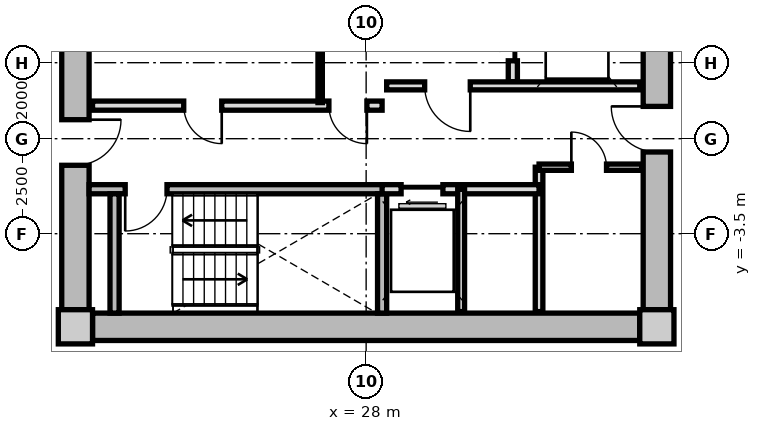
"""IFC4 building model, lengths in metres.
Left out: names, types, materials, properties, quantities, classifications, styles, units other than length and angle.
Written with IfcOpenShell. Run it as: python <this file> out.ifc"""

import sys

from ifc_helpers import new_model, si_unit, direction, frame, frame_2d, origin, origin_2d, place, context, subcontext, project, spatial, rectangle, extrude, source, transform, mapped, element, fill, save


model = new_model("IFC4")
c1 = context("Model", 3, precision=1e-05, world=origin(), true_north=direction((0.0, 1.0)))
c2 = subcontext(c1, "Body", "Model", "MODEL_VIEW")
j1 = project(units=[si_unit("LENGTHUNIT", "METRE"), si_unit("PLANEANGLEUNIT", "RADIAN")], contexts=[c1])
p1 = place(None, origin())
s1 = spatial("IfcSite", under=j1, at=p1, CompositionType="ELEMENT")
p2 = place(p1, origin())
s2 = spatial("IfcBuilding", under=s1, at=p2, CompositionType="ELEMENT")
p3 = place(p2, frame((0.0, 0.0, 102.35)))
s3 = spatial("IfcBuildingStorey", under=s2, at=p3, CompositionType="ELEMENT", Elevation=102.35)
m1 = source(origin(), c2, "Body", "SweptSolid", [
    extrude(rectangle(XDim=0.9, YDim=0.9, at=origin_2d()), origin(), (0.0, 0.0, 1.0), 3.05),
])
for number, where, z_axis, x_axis in (
    (1, (20.35, -5.95, 0.0), (0.0, 0.0, 1.0), (1.0, 0.0, 0.0)),
    (2, (35.65, -5.95, 0.0), (0.0, 0.0, 1.0), (1.0, 0.0, 0.0)),
):
    element("IfcColumn", number, at=place(p3, frame(where, z_axis=z_axis, x_axis=x_axis)), inside=s3, PredefinedType="COLUMN", context=c2, shape_type="MappedRepresentation", body=[
        mapped(m1, transform((0.0, 0.0, 0.0), x_axis=(1.0, 0.0, 0.0), y_axis=(0.0, 1.0, 0.0), z_axis=(0.0, 0.0, 1.0), scale=1.0)),
    ])
m2 = source(origin(), c2, "Body", "SweptSolid", [
    extrude(rectangle(XDim=14.4, YDim=0.72, at=frame_2d((7.2, 0.0))), origin(), (0.0, 0.0, 1.0), 2.79),
])
p4 = place(p3, frame((35.2, -5.95, 0.0), z_axis=(0.0, 0.0, 1.0), x_axis=(-1.0, 0.0, 0.0)))
e3 = element("IfcWall", 3, at=p4, inside=s3, PredefinedType="SHEAR", context=c2, shape_type="MappedRepresentation", body=[
    mapped(m2, transform((0.0, 0.0, 0.0), x_axis=(1.0, 0.0, 0.0), y_axis=(0.0, 1.0, 0.0), z_axis=(0.0, 0.0, 1.0), scale=1.0)),
])
m3 = source(origin(), c2, "Body", "SweptSolid", [
    extrude(rectangle(XDim=11.0, YDim=0.72, at=frame_2d((5.5, 0.0))), origin(), (0.0, 0.0, 1.0), 2.79),
])
p5 = place(p3, frame((20.35, -5.5, 0.0), z_axis=(0.0, 0.0, 1.0), x_axis=(0.0, 1.0, 0.0)))
e4 = element("IfcWall", 4, at=p5, inside=s3, PredefinedType="SHEAR", context=c2, shape_type="MappedRepresentation", body=[
    mapped(m3, transform((0.0, 0.0, 0.0), x_axis=(1.0, 0.0, 0.0), y_axis=(0.0, 1.0, 0.0), z_axis=(0.0, 0.0, 1.0), scale=1.0)),
])
p6 = place(p5, frame((3.8, 0.0, 0.0)))
e5 = element("IfcOpeningElement", 5, at=p6, cuts=e4, PredefinedType="OPENING", context=c2, shape_type="SweptSolid", body=[
    extrude(rectangle(XDim=1.2, YDim=2.15, at=frame_2d((0.6, 1.075))), frame((0.0, 0.37, 0.0), z_axis=(0.0, -1.0, 0.0), x_axis=(1.0, 0.0, 0.0)), (0.0, 0.0, 1.0), 0.74),
])
p7 = place(p3, frame((35.65, 5.5, 0.0), z_axis=(0.0, 0.0, 1.0), x_axis=(0.0, -1.0, 0.0)))
e6 = element("IfcWall", 6, at=p7, inside=s3, PredefinedType="SHEAR", context=c2, shape_type="MappedRepresentation", body=[
    mapped(m3, transform((0.0, 0.0, 0.0), x_axis=(1.0, 0.0, 0.0), y_axis=(0.0, 1.0, 0.0), z_axis=(0.0, 0.0, 1.0), scale=1.0)),
])
p8 = place(p7, frame((5.65, 0.0, 0.0)))
e7 = element("IfcOpeningElement", 7, at=p8, cuts=e6, PredefinedType="OPENING", context=c2, shape_type="SweptSolid", body=[
    extrude(rectangle(XDim=1.2, YDim=2.15, at=frame_2d((0.6, 1.075))), frame((0.0, 0.37, 0.0), z_axis=(0.0, -1.0, 0.0), x_axis=(1.0, 0.0, 0.0)), (0.0, 0.0, 1.0), 0.74),
])
m4 = source(origin(), c2, "Body", "SweptSolid", [
    extrude(rectangle(XDim=7.83, YDim=0.24, at=frame_2d((3.915, 0.0))), origin(), (0.0, 0.0, 1.0), 2.79),
])
p9 = place(p3, frame((20.71, -2.33, 0.0), z_axis=(0.0, 0.0, 1.0), x_axis=(1.0, 0.0, 0.0)))
e8 = element("IfcWall", 8, at=p9, inside=s3, PredefinedType="PARTITIONING", context=c2, shape_type="MappedRepresentation", body=[
    mapped(m4, transform((0.0, 0.0, 0.0), x_axis=(1.0, 0.0, 0.0), y_axis=(0.0, 1.0, 0.0), z_axis=(0.0, 0.0, 1.0), scale=1.0)),
])
p10 = place(p9, frame((0.95, 0.0, 0.0)))
e9 = element("IfcOpeningElement", 9, at=p10, cuts=e8, PredefinedType="OPENING", context=c2, shape_type="SweptSolid", body=[
    extrude(rectangle(XDim=1.1, YDim=2.15, at=frame_2d((0.55, 1.075))), frame((0.0, 0.13, 0.0), z_axis=(0.0, -1.0, 0.0), x_axis=(1.0, 0.0, 0.0)), (0.0, 0.0, 1.0), 0.26),
])
m5 = source(origin(), c2, "Body", "SweptSolid", [
    extrude(rectangle(XDim=3.14, YDim=0.24, at=frame_2d((1.57, 0.0))), origin(), (0.0, 0.0, 1.0), 2.79),
])
for number, where, z_axis, x_axis in (
    (10, (21.38, -5.59, 0.0), (0.0, 0.0, 1.0), (0.0, 1.0, 0.0)),
    (11, (28.42, -5.59, 0.0), (0.0, 0.0, 1.0), (0.0, 1.0, 0.0)),
):
    element("IfcWall", number, at=place(p3, frame(where, z_axis=z_axis, x_axis=x_axis)), inside=s3, PredefinedType="PARTITIONING", context=c2, shape_type="MappedRepresentation", body=[
        mapped(m5, transform((0.0, 0.0, 0.0), x_axis=(1.0, 0.0, 0.0), y_axis=(0.0, 1.0, 0.0), z_axis=(0.0, 0.0, 1.0), scale=1.0)),
    ])
m6 = source(origin(), c2, "Body", "SweptSolid", [
    extrude(rectangle(XDim=5.0, YDim=0.24, at=frame_2d((2.5, 0.0))), origin(), (0.0, 0.0, 1.0), 2.775),
])
p11 = place(p3, frame((31.86, 0.5, 0.0), z_axis=(0.0, 0.0, 1.0), x_axis=(0.0, 1.0, 0.0)))
e12 = element("IfcWall", 12, at=p11, inside=s3, PredefinedType="PARTITIONING", context=c2, shape_type="MappedRepresentation", body=[
    mapped(m6, transform((0.0, 0.0, 0.0), x_axis=(1.0, 0.0, 0.0), y_axis=(0.0, 1.0, 0.0), z_axis=(0.0, 0.0, 1.0), scale=1.0)),
])
p12 = place(p11, frame((3.05, 0.0, 0.0)))
e13 = element("IfcOpeningElement", 13, at=p12, cuts=e12, PredefinedType="OPENING", context=c2, shape_type="SweptSolid", body=[
    extrude(rectangle(XDim=1.3, YDim=2.2, at=frame_2d((0.65, 1.1))), frame((0.0, 0.13, 0.0), z_axis=(0.0, -1.0, 0.0), x_axis=(1.0, 0.0, 0.0)), (0.0, 0.0, 1.0), 0.26),
])
p13 = place(p11, frame((0.55, 0.0, 0.0)))
e14 = element("IfcOpeningElement", 14, at=p13, cuts=e12, PredefinedType="OPENING", context=c2, shape_type="SweptSolid", body=[
    extrude(rectangle(XDim=1.3, YDim=2.2, at=frame_2d((0.65, 1.1))), frame((0.0, 0.13, 0.0), z_axis=(0.0, -1.0, 0.0), x_axis=(1.0, 0.0, 0.0)), (0.0, 0.0, 1.0), 0.26),
])
m7 = source(origin(), c2, "Body", "SweptSolid", [
    extrude(rectangle(XDim=6.66, YDim=0.21, at=frame_2d((3.33, 0.0))), origin(), (0.0, 0.0, 1.0), 2.775),
])
p14 = place(p3, frame((28.54, 0.39, 0.0), z_axis=(0.0, 0.0, 1.0), x_axis=(1.0, 0.0, 0.0)))
e15 = element("IfcWall", 15, at=p14, inside=s3, PredefinedType="PARTITIONING", context=c2, shape_type="MappedRepresentation", body=[
    mapped(m7, transform((0.0, 0.0, 0.0), x_axis=(1.0, 0.0, 0.0), y_axis=(0.0, 1.0, 0.0), z_axis=(0.0, 0.0, 1.0), scale=1.0)),
])
p15 = place(p14, frame((1.0, 0.0, 0.0)))
e16 = element("IfcOpeningElement", 16, at=p15, cuts=e15, PredefinedType="OPENING", context=c2, shape_type="SweptSolid", body=[
    extrude(rectangle(XDim=1.2, YDim=2.15, at=frame_2d((0.6, 1.075))), frame((0.0, 0.115, 0.0), z_axis=(0.0, -1.0, 0.0), x_axis=(1.0, 0.0, 0.0)), (0.0, 0.0, 1.0), 0.23),
])
m8 = source(origin(), c2, "Body", "SweptSolid", [
    extrude(rectangle(XDim=7.62, YDim=0.24, at=frame_2d((3.81, 0.0))), origin(), (0.0, 0.0, 1.0), 2.775),
])
p16 = place(p3, frame((20.8, -0.13, 0.0), z_axis=(0.0, 0.0, 1.0), x_axis=(1.0, 0.0, 0.0)))
e17 = element("IfcWall", 17, at=p16, inside=s3, PredefinedType="PARTITIONING", context=c2, shape_type="MappedRepresentation", body=[
    mapped(m8, transform((0.0, 0.0, 0.0), x_axis=(1.0, 0.0, 0.0), y_axis=(0.0, 1.0, 0.0), z_axis=(0.0, 0.0, 1.0), scale=1.0)),
])
p17 = place(p16, frame((6.22, 0.0, 0.0)))
e18 = element("IfcOpeningElement", 18, at=p17, cuts=e17, PredefinedType="OPENING", context=c2, shape_type="SweptSolid", body=[
    extrude(rectangle(XDim=1.0, YDim=2.1, at=frame_2d((0.5, 1.05))), frame((0.0, 0.13, 0.0), z_axis=(0.0, -1.0, 0.0), x_axis=(1.0, 0.0, 0.0)), (0.0, 0.0, 1.0), 0.26),
])
p18 = place(p16, frame((2.4, 0.0, 0.0)))
e19 = element("IfcOpeningElement", 19, at=p18, cuts=e17, PredefinedType="OPENING", context=c2, shape_type="SweptSolid", body=[
    extrude(rectangle(XDim=1.0, YDim=2.1, at=frame_2d((0.5, 1.05))), frame((0.0, 0.13, 0.0), z_axis=(0.0, -1.0, 0.0), x_axis=(1.0, 0.0, 0.0)), (0.0, 0.0, 1.0), 0.26),
])
m9 = source(origin(), c2, "Body", "SweptSolid", [
    extrude(rectangle(XDim=2.33, YDim=0.115, at=frame_2d((1.165, 0.0))), origin(), (0.0, 0.0, 1.0), 2.775),
])
p19 = place(p3, frame((26.79, -0.05, 0.0), z_axis=(0.0, 0.0, 1.0), x_axis=(0.0, 1.0, 0.0)))
e20 = element("IfcWall", 20, at=p19, inside=s3, PredefinedType="PARTITIONING", context=c2, shape_type="MappedRepresentation", body=[
    mapped(m9, transform((0.0, 0.0, 0.0), x_axis=(1.0, 0.0, 0.0), y_axis=(0.0, 1.0, 0.0), z_axis=(0.0, 0.0, 1.0), scale=1.0)),
])
m10 = source(origin(), c2, "Body", "SweptSolid", [
    extrude(rectangle(XDim=3.8, YDim=0.2, at=frame_2d((1.9, 0.0))), origin(), (0.0, 0.0, 1.0), 2.775),
])
p20 = place(p3, frame((32.55, -5.55, 0.0), z_axis=(0.0, 0.0, 1.0), x_axis=(0.0, 1.0, 0.0)))
e21 = element("IfcWall", 21, at=p20, inside=s3, PredefinedType="PARTITIONING", context=c2, shape_type="MappedRepresentation", body=[
    mapped(m10, transform((0.0, 0.0, 0.0), x_axis=(1.0, 0.0, 0.0), y_axis=(0.0, 1.0, 0.0), z_axis=(0.0, 0.0, 1.0), scale=1.0)),
])
m11 = source(origin(), c2, "Body", "SweptSolid", [
    extrude(rectangle(XDim=4.13, YDim=0.24, at=frame_2d((2.065, 0.0))), origin(), (0.0, 0.0, 1.0), 2.775),
])
p21 = place(p3, frame((28.42, -2.33, 0.0), z_axis=(0.0, 0.0, 1.0), x_axis=(1.0, 0.0, 0.0)))
e22 = element("IfcWall", 22, at=p21, inside=s3, PredefinedType="PARTITIONING", context=c2, shape_type="MappedRepresentation", body=[
    mapped(m11, transform((0.0, 0.0, 0.0), x_axis=(1.0, 0.0, 0.0), y_axis=(0.0, 1.0, 0.0), z_axis=(0.0, 0.0, 1.0), scale=1.0)),
])
p22 = place(p21, frame((0.5, 0.0, 0.0)))
e23 = element("IfcOpeningElement", 23, at=p22, cuts=e22, PredefinedType="OPENING", context=c2, shape_type="SweptSolid", body=[
    extrude(rectangle(XDim=1.1, YDim=2.2, at=frame_2d((0.55, 1.1))), frame((0.0, 0.13, 0.0), z_axis=(0.0, -1.0, 0.0), x_axis=(1.0, 0.0, 0.0)), (0.0, 0.0, 1.0), 0.26),
])
m12 = source(origin(), c2, "Body", "SweptSolid", [
    extrude(rectangle(XDim=3.22, YDim=0.18, at=frame_2d((1.61, 0.0))), origin(), (0.0, 0.0, 1.0), 2.775),
])
p23 = place(p3, frame((30.5, -5.55, 0.0), z_axis=(0.0, 0.0, 1.0), x_axis=(0.0, 1.0, 0.0)))
e24 = element("IfcWall", 24, at=p23, inside=s3, PredefinedType="PARTITIONING", context=c2, shape_type="MappedRepresentation", body=[
    mapped(m12, transform((0.0, 0.0, 0.0), x_axis=(1.0, 0.0, 0.0), y_axis=(0.0, 1.0, 0.0), z_axis=(0.0, 0.0, 1.0), scale=1.0)),
])
m13 = source(origin(), c2, "Body", "SweptSolid", [
    extrude(rectangle(XDim=2.7, YDim=0.165, at=frame_2d((1.35, 0.0))), origin(), (0.0, 0.0, 1.0), 2.775),
])
p24 = place(p3, frame((32.55, -1.75, 0.0), z_axis=(0.0, 0.0, 1.0), x_axis=(1.0, 0.0, 0.0)))
e25 = element("IfcWall", 25, at=p24, inside=s3, PredefinedType="PARTITIONING", context=c2, shape_type="MappedRepresentation", body=[
    mapped(m13, transform((0.0, 0.0, 0.0), x_axis=(1.0, 0.0, 0.0), y_axis=(0.0, 1.0, 0.0), z_axis=(0.0, 0.0, 1.0), scale=1.0)),
])
p25 = place(p24, frame((0.85, 0.0, 0.0)))
e26 = element("IfcOpeningElement", 26, at=p25, cuts=e25, PredefinedType="OPENING", context=c2, shape_type="SweptSolid", body=[
    extrude(rectangle(XDim=0.925, YDim=2.1, at=frame_2d((0.462, 1.05))), frame((0.0, 0.093, 0.0), z_axis=(0.0, -1.0, 0.0), x_axis=(1.0, 0.0, 0.0)), (0.0, 0.0, 1.0), 0.185),
])
m14 = source(origin(), c2, "Body", "SweptSolid", [
    extrude(rectangle(XDim=1.1, YDim=2.15, at=frame_2d((0.55, 1.075))), frame((0.0, 0.025, 0.0), z_axis=(0.0, -1.0, 0.0), x_axis=(1.0, 0.0, 0.0)), (0.0, 0.0, 1.0), 0.05),
])
p26 = place(p10, frame((1.1, 0.0, 0.0), z_axis=(0.0, 0.0, 1.0), x_axis=(-1.0, 0.0, 0.0)))
e27 = element("IfcDoor", 27, at=p26, inside=s3, OperationType="SINGLE_SWING_RIGHT", PredefinedType="DOOR", context=c2, shape_type="MappedRepresentation", body=[
    mapped(m14, transform((0.0, 0.0, 0.0), x_axis=(1.0, 0.0, 0.0), y_axis=(0.0, 1.0, 0.0), z_axis=(0.0, 0.0, 1.0), scale=1.0)),
])
fill(e9, e27)
m15 = source(origin(), c2, "Body", "SweptSolid", [
    extrude(rectangle(XDim=1.3, YDim=2.2, at=frame_2d((0.65, 1.1))), frame((0.0, 0.025, 0.0), z_axis=(0.0, -1.0, 0.0), x_axis=(1.0, 0.0, 0.0)), (0.0, 0.0, 1.0), 0.05),
])
p27 = place(p13, origin())
e28 = element("IfcDoor", 28, at=p27, inside=s3, OperationType="SLIDING_TO_RIGHT", PredefinedType="DOOR", context=c2, shape_type="MappedRepresentation", body=[
    mapped(m15, transform((0.0, 0.0, 0.0), x_axis=(1.0, 0.0, 0.0), y_axis=(0.0, 1.0, 0.0), z_axis=(0.0, 0.0, 1.0), scale=1.0)),
])
fill(e14, e28)
m16 = source(origin(), c2, "Body", "SweptSolid", [
    extrude(rectangle(XDim=1.2, YDim=2.15, at=frame_2d((0.6, 1.075))), frame((0.0, 0.025, 0.0), z_axis=(0.0, -1.0, 0.0), x_axis=(1.0, 0.0, 0.0)), (0.0, 0.0, 1.0), 0.05),
])
p28 = place(p15, frame((1.2, 0.0, 0.0), z_axis=(0.0, 0.0, 1.0), x_axis=(-1.0, 0.0, 0.0)))
e29 = element("IfcDoor", 29, at=p28, inside=s3, OperationType="SINGLE_SWING_LEFT", PredefinedType="DOOR", context=c2, shape_type="MappedRepresentation", body=[
    mapped(m16, transform((0.0, 0.0, 0.0), x_axis=(1.0, 0.0, 0.0), y_axis=(0.0, 1.0, 0.0), z_axis=(0.0, 0.0, 1.0), scale=1.0)),
])
fill(e16, e29)
p29 = place(p6, frame((1.2, 0.0, 0.0), z_axis=(0.0, 0.0, 1.0), x_axis=(-1.0, 0.0, 0.0)))
e30 = element("IfcDoor", 30, at=p29, inside=s3, OperationType="SINGLE_SWING_LEFT", PredefinedType="DOOR", context=c2, shape_type="MappedRepresentation", body=[
    mapped(m16, transform((0.0, 0.0, 0.0), x_axis=(1.0, 0.0, 0.0), y_axis=(0.0, 1.0, 0.0), z_axis=(0.0, 0.0, 1.0), scale=1.0)),
])
fill(e5, e30)
p30 = place(p8, frame((1.2, 0.0, 0.0), z_axis=(0.0, 0.0, 1.0), x_axis=(-1.0, 0.0, 0.0)))
e31 = element("IfcDoor", 31, at=p30, inside=s3, OperationType="SINGLE_SWING_RIGHT", PredefinedType="DOOR", context=c2, shape_type="MappedRepresentation", body=[
    mapped(m16, transform((0.0, 0.0, 0.0), x_axis=(1.0, 0.0, 0.0), y_axis=(0.0, 1.0, 0.0), z_axis=(0.0, 0.0, 1.0), scale=1.0)),
])
fill(e7, e31)
m17 = source(origin(), c2, "Body", "SweptSolid", [
    extrude(rectangle(XDim=1.0, YDim=2.1, at=frame_2d((0.5, 1.05))), frame((0.0, 0.025, 0.0), z_axis=(0.0, -1.0, 0.0), x_axis=(1.0, 0.0, 0.0)), (0.0, 0.0, 1.0), 0.05),
])
p31 = place(p17, frame((1.0, 0.0, 0.0), z_axis=(0.0, 0.0, 1.0), x_axis=(-1.0, 0.0, 0.0)))
e32 = element("IfcDoor", 32, at=p31, inside=s3, OperationType="SINGLE_SWING_LEFT", PredefinedType="DOOR", context=c2, shape_type="MappedRepresentation", body=[
    mapped(m17, transform((0.0, 0.0, 0.0), x_axis=(1.0, 0.0, 0.0), y_axis=(0.0, 1.0, 0.0), z_axis=(0.0, 0.0, 1.0), scale=1.0)),
])
fill(e18, e32)
p32 = place(p18, frame((1.0, 0.0, 0.0), z_axis=(0.0, 0.0, 1.0), x_axis=(-1.0, 0.0, 0.0)))
e33 = element("IfcDoor", 33, at=p32, inside=s3, OperationType="SINGLE_SWING_LEFT", PredefinedType="DOOR", context=c2, shape_type="MappedRepresentation", body=[
    mapped(m17, transform((0.0, 0.0, 0.0), x_axis=(1.0, 0.0, 0.0), y_axis=(0.0, 1.0, 0.0), z_axis=(0.0, 0.0, 1.0), scale=1.0)),
])
fill(e19, e33)
m18 = source(origin(), c2, "Body", "SweptSolid", [
    extrude(rectangle(XDim=1.1, YDim=2.2, at=frame_2d((0.55, 1.1))), frame((0.0, 0.025, 0.0), z_axis=(0.0, -1.0, 0.0), x_axis=(1.0, 0.0, 0.0)), (0.0, 0.0, 1.0), 0.05),
])
p33 = place(p22, frame((1.1, 0.0, 0.0), z_axis=(0.0, 0.0, 1.0), x_axis=(-1.0, 0.0, 0.0)))
e34 = element("IfcDoor", 34, at=p33, inside=s3, OperationType="SLIDING_TO_LEFT", PredefinedType="DOOR", context=c2, shape_type="MappedRepresentation", body=[
    mapped(m18, transform((0.0, 0.0, 0.0), x_axis=(1.0, 0.0, 0.0), y_axis=(0.0, 1.0, 0.0), z_axis=(0.0, 0.0, 1.0), scale=1.0)),
])
fill(e23, e34)
m19 = source(origin(), c2, "Body", "SweptSolid", [
    extrude(rectangle(XDim=0.925, YDim=2.1, at=frame_2d((0.462, 1.05))), frame((0.0, 0.025, 0.0), z_axis=(0.0, -1.0, 0.0), x_axis=(1.0, 0.0, 0.0)), (0.0, 0.0, 1.0), 0.05),
])
p34 = place(p25, origin())
e35 = element("IfcDoor", 35, at=p34, inside=s3, OperationType="SINGLE_SWING_LEFT", PredefinedType="DOOR", context=c2, shape_type="MappedRepresentation", body=[
    mapped(m19, transform((0.0, 0.0, 0.0), x_axis=(1.0, 0.0, 0.0), y_axis=(0.0, 1.0, 0.0), z_axis=(0.0, 0.0, 1.0), scale=1.0)),
])
fill(e26, e35)
save(model, sys.argv[1])
